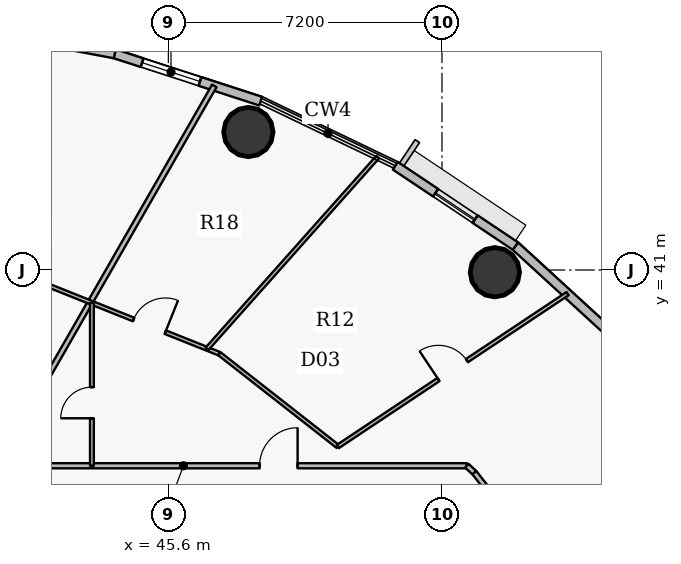
"""IFC4 building model, lengths in metres.
Left out: names, types, materials, properties, quantities, classifications, styles, units other than length and angle.
Written with IfcOpenShell. Run it as: python <this file> out.ifc"""

import sys

from ifc_helpers import new_model, si_unit, direction, frame, frame_2d, origin, origin_2d, place, context, subcontext, project, spatial, rectangle, hollow_circle, extrude, source, transform, mapped, element, fill, save


model = new_model("IFC4")
c1 = context("Model", 3, precision=1e-05, world=origin(), true_north=direction((0.0, 1.0)))
c2 = subcontext(c1, "Body", "Model", "MODEL_VIEW")
j1 = project(units=[si_unit("LENGTHUNIT", "METRE"), si_unit("PLANEANGLEUNIT", "RADIAN")], contexts=[c1])
p1 = place(None, origin())
s1 = spatial("IfcSite", under=j1, at=p1, CompositionType="ELEMENT")
p2 = place(p1, origin())
s2 = spatial("IfcBuilding", under=s1, at=p2, CompositionType="ELEMENT")
p3 = place(p2, frame((0.0, 0.0, 201.15)))
s3 = spatial("IfcBuildingStorey", under=s2, at=p3, CompositionType="ELEMENT", Elevation=201.15)
for number, where, z_axis, x_axis in (
    (1, (54.192, 40.942, 0.0), (0.0, 0.0, 1.0), (1.0, 0.0, 0.0)),
    (2, (47.706, 44.631, 0.0), (0.0, 0.0, 1.0), (1.0, 0.0, 0.0)),
):
    element("IfcColumn", number, at=place(p3, frame(where, z_axis=z_axis, x_axis=x_axis)), inside=s3, PredefinedType="COLUMN", context=c2, shape_type="SweptSolid", body=[
        extrude(hollow_circle(Radius=0.65, WallThickness=0.04, at=origin_2d()), origin(), (0.0, 0.0, 1.0), 3.75),
    ])
p4 = place(p3, frame((54.732, 41.631, 0.0), z_axis=(0.0, 0.0, 1.0), x_axis=(0.737076565834, -0.675809245349, 0.0)))
e3 = element("IfcWall", 3, at=p4, inside=s3, PredefinedType="SOLIDWALL", context=c2, shape_type="SweptSolid", body=[
    extrude(rectangle(XDim=3.658, YDim=0.24, at=frame_2d((1.829, 0.0))), origin(), (0.0, 0.0, 1.0), 3.45),
])
p5 = place(p3, frame((51.573, 43.743, 0.0), z_axis=(0.0, 0.0, 1.0), x_axis=(0.831228998277, -0.555930168657, 0.0)))
e4 = element("IfcWall", 4, at=p5, inside=s3, PredefinedType="SOLIDWALL", context=c2, shape_type="SweptSolid", body=[
    extrude(rectangle(XDim=3.8, YDim=0.24, at=frame_2d((1.9, 0.0))), origin(), (0.0, 0.0, 1.0), 3.45),
])
p6 = place(p5, frame((1.275, 0.0, 0.9)))
e5 = element("IfcOpeningElement", 5, at=p6, cuts=e4, PredefinedType="OPENING", context=c2, shape_type="SweptSolid", body=[
    extrude(rectangle(XDim=1.25, YDim=1.65, at=origin_2d()), frame((0.625, 0.13, 0.825), z_axis=(0.0, -1.0, 0.0), x_axis=(1.0, 0.0, 0.0)), (0.0, 0.0, 1.0), 0.26),
])
p7 = place(p3, frame((44.189, 46.689, 0.0), z_axis=(0.0, 0.0, 1.0), x_axis=(0.951209870236, -0.30854462038, 0.0)))
e6 = element("IfcWall", 6, at=p7, inside=s3, PredefinedType="SOLIDWALL", context=c2, shape_type="SweptSolid", body=[
    extrude(rectangle(XDim=4.038, YDim=0.24, at=frame_2d((2.019, 0.0))), origin(), (0.0, 0.0, 1.0), 3.45),
])
p8 = place(p7, frame((0.757, 0.0, 0.9)))
e7 = element("IfcOpeningElement", 7, at=p8, cuts=e6, PredefinedType="OPENING", context=c2, shape_type="SweptSolid", body=[
    extrude(rectangle(XDim=1.6, YDim=1.75, at=origin_2d()), frame((0.8, 0.13, 0.875), z_axis=(0.0, -1.0, 0.0), x_axis=(1.0, 0.0, 0.0)), (0.0, 0.0, 1.0), 0.26),
])
p9 = place(p3, frame((40.146, 47.449, 0.0), z_axis=(0.0, 0.0, 1.0), x_axis=(0.982788108205, -0.184736391573, 0.0)))
e8 = element("IfcWall", 8, at=p9, inside=s3, PredefinedType="SOLIDWALL", context=c2, shape_type="SweptSolid", body=[
    extrude(rectangle(XDim=4.114, YDim=0.24, at=frame_2d((2.057, 0.0))), origin(), (0.0, 0.0, 1.0), 3.45),
])
p10 = place(p9, frame((1.057, 0.0, 0.9)))
e9 = element("IfcOpeningElement", 9, at=p10, cuts=e8, PredefinedType="OPENING", context=c2, shape_type="SweptSolid", body=[
    extrude(rectangle(XDim=2.0, YDim=1.75, at=origin_2d()), frame((1.0, 0.13, 0.875), z_axis=(0.0, -1.0, 0.0), x_axis=(1.0, 0.0, 0.0)), (0.0, 0.0, 1.0), 0.26),
])
p11 = place(p3, frame((38.541, 35.85, 0.0), z_axis=(0.0, 0.0, 1.0), x_axis=(1.0, 0.0, 0.0)))
e10 = element("IfcWall", 10, at=p11, inside=s3, PredefinedType="PARTITIONING", context=c2, shape_type="SweptSolid", body=[
    extrude(rectangle(XDim=14.913, YDim=0.135, at=frame_2d((7.456, 0.0))), origin(), (0.0, 0.0, 1.0), 2.885),
])
p12 = place(p11, frame((9.46, 0.0, 0.0)))
e11 = element("IfcOpeningElement", 11, at=p12, cuts=e10, PredefinedType="OPENING", context=c2, shape_type="SweptSolid", body=[
    extrude(rectangle(XDim=1.0, YDim=2.15, at=origin_2d()), frame((0.5, 0.078, 1.075), z_axis=(0.0, -1.0, 0.0), x_axis=(1.0, 0.0, 0.0)), (0.0, 0.0, 1.0), 0.155),
])
p13 = place(p3, frame((41.076, 35.85, 0.0), z_axis=(0.0, 0.0, 1.0), x_axis=(0.497557605347, 0.867430936364, 0.0)))
e12 = element("IfcWall", 12, at=p13, inside=s3, PredefinedType="PARTITIONING", context=c2, shape_type="SweptSolid", body=[
    extrude(rectangle(XDim=11.522, YDim=0.135, at=frame_2d((5.761, 0.0))), origin(), (0.0, 0.0, 1.0), 2.885),
])
p14 = place(p3, frame((41.754, 40.867, 0.0), z_axis=(0.0, 0.0, 1.0), x_axis=(0.928792710591, -0.370599650233, 0.0)))
e13 = element("IfcWall", 13, at=p14, inside=s3, PredefinedType="PARTITIONING", context=c2, shape_type="SweptSolid", body=[
    extrude(rectangle(XDim=5.588, YDim=0.1, at=frame_2d((2.794, 0.0))), origin(), (0.0, 0.0, 1.0), 2.885),
])
p15 = place(p14, frame((3.156, 0.0, 0.0)))
e14 = element("IfcOpeningElement", 14, at=p15, cuts=e13, PredefinedType="OPENING", context=c2, shape_type="SweptSolid", body=[
    extrude(rectangle(XDim=0.9, YDim=2.1, at=origin_2d()), frame((0.45, 0.06, 1.05), z_axis=(0.0, -1.0, 0.0), x_axis=(1.0, 0.0, 0.0)), (0.0, 0.0, 1.0), 0.12),
])
p16 = place(p3, frame((43.589, 35.85, 0.0), z_axis=(0.0, 0.0, 1.0), x_axis=(0.0, 1.0, 0.0)))
e15 = element("IfcWall", 15, at=p16, inside=s3, PredefinedType="PARTITIONING", context=c2, shape_type="SweptSolid", body=[
    extrude(rectangle(XDim=4.285, YDim=0.1, at=frame_2d((2.143, 0.0))), origin(), (0.0, 0.0, 1.0), 2.885),
])
p17 = place(p16, frame((1.249, 0.0, 0.0)))
e16 = element("IfcOpeningElement", 16, at=p17, cuts=e15, PredefinedType="OPENING", context=c2, shape_type="SweptSolid", body=[
    extrude(rectangle(XDim=0.82, YDim=2.1, at=origin_2d()), frame((0.41, 0.06, 1.05), z_axis=(0.0, -1.0, 0.0), x_axis=(1.0, 0.0, 0.0)), (0.0, 0.0, 1.0), 0.12),
])
p18 = place(p3, frame((46.617, 38.927, 0.0), z_axis=(0.0, 0.0, 1.0), x_axis=(0.664908846083, 0.746924511849, 0.0)))
e17 = element("IfcWall", 17, at=p18, inside=s3, PredefinedType="PARTITIONING", context=c2, shape_type="SweptSolid", body=[
    extrude(rectangle(XDim=6.754, YDim=0.1, at=frame_2d((3.377, 0.0))), origin(), (0.0, 0.0, 1.0), 2.885),
])
p19 = place(p3, frame((46.945, 38.796, 0.0), z_axis=(0.0, 0.0, 1.0), x_axis=(0.787314896848, -0.616551095369, 0.0)))
e18 = element("IfcWall", 18, at=p19, inside=s3, PredefinedType="PARTITIONING", context=c2, shape_type="SweptSolid", body=[
    extrude(rectangle(XDim=3.958, YDim=0.1, at=frame_2d((1.979, 0.0))), origin(), (0.0, 0.0, 1.0), 2.885),
])
p20 = place(p3, frame((50.06, 36.356, 0.0), z_axis=(0.0, 0.0, 1.0), x_axis=(0.832520763353, 0.553993843455, 0.0)))
e19 = element("IfcWall", 19, at=p20, inside=s3, PredefinedType="PARTITIONING", context=c2, shape_type="SweptSolid", body=[
    extrude(rectangle(XDim=7.26, YDim=0.1, at=frame_2d((3.63, 0.0))), origin(), (0.0, 0.0, 1.0), 2.885),
])
p21 = place(p20, frame((3.18, 0.0, 0.0)))
e20 = element("IfcOpeningElement", 20, at=p21, cuts=e19, PredefinedType="OPENING", context=c2, shape_type="SweptSolid", body=[
    extrude(rectangle(XDim=0.9, YDim=2.1, at=origin_2d()), frame((0.45, 0.06, 1.05), z_axis=(0.0, -1.0, 0.0), x_axis=(1.0, 0.0, 0.0)), (0.0, 0.0, 1.0), 0.12),
])
p22 = place(p3, frame((53.454, 35.85, 0.0), z_axis=(0.0, 0.0, 1.0), x_axis=(0.736667385572, -0.676255249913, 0.0)))
e21 = element("IfcWall", 21, at=p22, inside=s3, PredefinedType="PARTITIONING", context=c2, shape_type="SweptSolid", body=[
    extrude(rectangle(XDim=0.271, YDim=0.135, at=frame_2d((0.135, 0.0))), origin(), (0.0, 0.0, 1.0), 3.45),
])
p23 = place(p3, frame((53.653, 35.667, 0.0), z_axis=(0.0, 0.0, 1.0), x_axis=(0.616302223209, -0.787509726713, 0.0)))
e22 = element("IfcWall", 22, at=p23, inside=s3, PredefinedType="PARTITIONING", context=c2, shape_type="SweptSolid", body=[
    extrude(rectangle(XDim=2.18, YDim=0.135, at=frame_2d((1.09, 0.0))), origin(), (0.0, 0.0, 1.0), 3.45),
])
m1 = source(origin(), c2, "Body", "SweptSolid", [
    extrude(rectangle(XDim=1.6, YDim=1.75, at=origin_2d()), frame((0.8, 0.03, 0.875), z_axis=(0.0, -1.0, 0.0), x_axis=(1.0, 0.0, 0.0)), (0.0, 0.0, 1.0), 0.06),
])
p24 = place(p8, origin())
e23 = element("IfcWindow", 23, at=p24, inside=s3, PartitioningType="DOUBLE_PANEL_VERTICAL", PredefinedType="WINDOW", context=c2, shape_type="MappedRepresentation", body=[
    mapped(m1, transform((0.0, 0.0, 0.0), x_axis=(1.0, 0.0, 0.0), y_axis=(0.0, 1.0, 0.0), z_axis=(0.0, 0.0, 1.0), scale=1.0)),
])
fill(e7, e23)
m2 = source(origin(), c2, "Body", "SweptSolid", [
    extrude(rectangle(XDim=1.25, YDim=1.65, at=origin_2d()), frame((0.625, 0.03, 0.825), z_axis=(0.0, -1.0, 0.0), x_axis=(1.0, 0.0, 0.0)), (0.0, 0.0, 1.0), 0.06),
])
p25 = place(p6, origin())
e24 = element("IfcWindow", 24, at=p25, inside=s3, PartitioningType="SINGLE_PANEL", PredefinedType="WINDOW", context=c2, shape_type="MappedRepresentation", body=[
    mapped(m2, transform((0.0, 0.0, 0.0), x_axis=(1.0, 0.0, 0.0), y_axis=(0.0, 1.0, 0.0), z_axis=(0.0, 0.0, 1.0), scale=1.0)),
])
fill(e5, e24)
m3 = source(origin(), c2, "Body", "SweptSolid", [
    extrude(rectangle(XDim=1.0, YDim=2.15, at=origin_2d()), frame((0.5, 0.025, 1.075), z_axis=(0.0, -1.0, 0.0), x_axis=(1.0, 0.0, 0.0)), (0.0, 0.0, 1.0), 0.05),
])
p26 = place(p12, origin())
e25 = element("IfcDoor", 25, at=p26, inside=s3, OperationType="SINGLE_SWING_RIGHT", PredefinedType="DOOR", context=c2, shape_type="MappedRepresentation", body=[
    mapped(m3, transform((0.0, 0.0, 0.0), x_axis=(1.0, 0.0, 0.0), y_axis=(0.0, 1.0, 0.0), z_axis=(0.0, 0.0, 1.0), scale=1.0)),
])
fill(e11, e25)
m4 = source(origin(), c2, "Body", "SweptSolid", [
    extrude(rectangle(XDim=0.9, YDim=2.1, at=origin_2d()), frame((0.45, 0.025, 1.05), z_axis=(0.0, -1.0, 0.0), x_axis=(1.0, 0.0, 0.0)), (0.0, 0.0, 1.0), 0.05),
])
p27 = place(p21, origin())
e26 = element("IfcDoor", 26, at=p27, inside=s3, OperationType="SINGLE_SWING_LEFT", PredefinedType="DOOR", context=c2, shape_type="MappedRepresentation", body=[
    mapped(m4, transform((0.0, 0.0, 0.0), x_axis=(1.0, 0.0, 0.0), y_axis=(0.0, 1.0, 0.0), z_axis=(0.0, 0.0, 1.0), scale=1.0)),
])
fill(e20, e26)
p28 = place(p15, origin())
e27 = element("IfcDoor", 27, at=p28, inside=s3, OperationType="SINGLE_SWING_RIGHT", PredefinedType="DOOR", context=c2, shape_type="MappedRepresentation", body=[
    mapped(m4, transform((0.0, 0.0, 0.0), x_axis=(1.0, 0.0, 0.0), y_axis=(0.0, 1.0, 0.0), z_axis=(0.0, 0.0, 1.0), scale=1.0)),
])
fill(e14, e27)
m5 = source(origin(), c2, "Body", "SweptSolid", [
    extrude(rectangle(XDim=0.82, YDim=2.1, at=origin_2d()), frame((0.41, 0.025, 1.05), z_axis=(0.0, -1.0, 0.0), x_axis=(1.0, 0.0, 0.0)), (0.0, 0.0, 1.0), 0.05),
])
p29 = place(p17, origin())
e28 = element("IfcDoor", 28, at=p29, inside=s3, OperationType="SINGLE_SWING_LEFT", PredefinedType="DOOR", context=c2, shape_type="MappedRepresentation", body=[
    mapped(m5, transform((0.0, 0.0, 0.0), x_axis=(1.0, 0.0, 0.0), y_axis=(0.0, 1.0, 0.0), z_axis=(0.0, 0.0, 1.0), scale=1.0)),
])
fill(e16, e28)
save(model, sys.argv[1])
